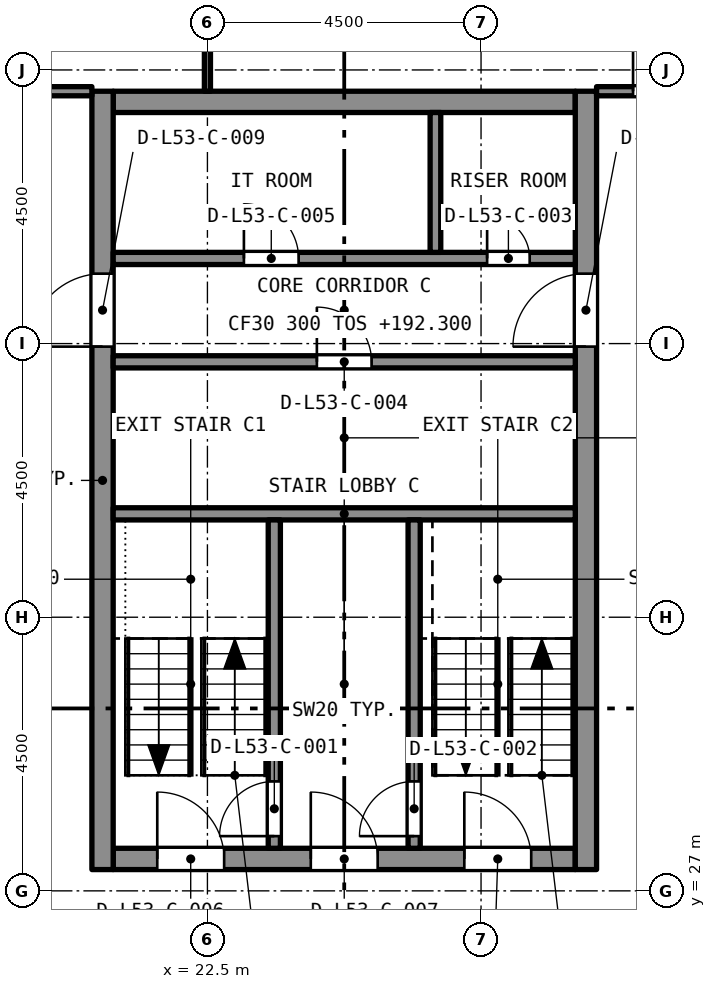
"""IFC4 building model, lengths in metres.
Left out: names, types, materials, properties, quantities, classifications, styles, units other than length and angle.
Written with IfcOpenShell. Run it as: python <this file> out.ifc"""

import sys

from ifc_helpers import new_model, si_unit, direction, frame, frame_2d, origin, place, context, subcontext, project, spatial, rectangle, extrude, element, fill, save


model = new_model("IFC4")
c1 = context("Model", 3, precision=1e-05, world=origin(), true_north=direction((0.0, 1.0)))
c2 = subcontext(c1, "Body", "Model", "MODEL_VIEW")
j1 = project(units=[si_unit("LENGTHUNIT", "METRE"), si_unit("PLANEANGLEUNIT", "RADIAN")], contexts=[c1])
p1 = place(None, origin())
s1 = spatial("IfcSite", under=j1, at=p1, CompositionType="ELEMENT")
p2 = place(p1, origin())
s2 = spatial("IfcBuilding", under=s1, at=p2, CompositionType="ELEMENT")
p3 = place(p2, frame((0.0, 0.0, 192.3)))
s3 = spatial("IfcBuildingStorey", under=s2, at=p3, CompositionType="ELEMENT", Elevation=192.3)
p4 = place(p3, frame((20.95, 27.525, 0.0), z_axis=(0.0, 0.0, 1.0), x_axis=(1.0, 0.0, 0.0)))
e1 = element("IfcWall", 1, at=p4, inside=s3, PredefinedType="SOLIDWALL", context=c2, shape_type="SweptSolid", body=[
    extrude(rectangle(XDim=7.6, YDim=0.35, at=frame_2d((3.8, 0.0))), origin(), (0.0, 0.0, 1.0), 3.2),
])
p5 = place(p4, frame((0.725, 0.0, 0.0)))
e2 = element("IfcOpeningElement", 2, at=p5, cuts=e1, PredefinedType="OPENING", context=c2, shape_type="SweptSolid", body=[
    extrude(rectangle(XDim=1.1, YDim=2.1, at=frame_2d((0.55, 1.05))), frame((0.0, 0.185, 0.0), z_axis=(0.0, -1.0, 0.0), x_axis=(1.0, 0.0, 0.0)), (0.0, 0.0, 1.0), 0.37),
])
p6 = place(p4, frame((3.25, 0.0, 0.0)))
e3 = element("IfcOpeningElement", 3, at=p6, cuts=e1, PredefinedType="OPENING", context=c2, shape_type="SweptSolid", body=[
    extrude(rectangle(XDim=1.1, YDim=2.1, at=frame_2d((0.55, 1.05))), frame((0.0, 0.185, 0.0), z_axis=(0.0, -1.0, 0.0), x_axis=(1.0, 0.0, 0.0)), (0.0, 0.0, 1.0), 0.37),
])
p7 = place(p4, frame((5.775, 0.0, 0.0)))
e4 = element("IfcOpeningElement", 4, at=p7, cuts=e1, PredefinedType="OPENING", context=c2, shape_type="SweptSolid", body=[
    extrude(rectangle(XDim=1.1, YDim=2.1, at=frame_2d((0.55, 1.05))), frame((0.0, 0.185, 0.0), z_axis=(0.0, -1.0, 0.0), x_axis=(1.0, 0.0, 0.0)), (0.0, 0.0, 1.0), 0.37),
])
p8 = place(p3, frame((20.95, 39.975, 0.0), z_axis=(0.0, 0.0, 1.0), x_axis=(1.0, 0.0, 0.0)))
e5 = element("IfcWall", 5, at=p8, inside=s3, PredefinedType="SOLIDWALL", context=c2, shape_type="SweptSolid", body=[
    extrude(rectangle(XDim=7.6, YDim=0.35, at=frame_2d((3.8, 0.0))), origin(), (0.0, 0.0, 1.0), 3.2),
])
p9 = place(p3, frame((20.775, 27.35, 0.0), z_axis=(0.0, 0.0, 1.0), x_axis=(0.0, 1.0, 0.0)))
e6 = element("IfcWall", 6, at=p9, inside=s3, PredefinedType="SOLIDWALL", context=c2, shape_type="SweptSolid", body=[
    extrude(rectangle(XDim=12.8, YDim=0.35, at=frame_2d((6.4, 0.0))), origin(), (0.0, 0.0, 1.0), 3.2),
])
p10 = place(p9, frame((8.6, 0.0, 0.0)))
e7 = element("IfcOpeningElement", 7, at=p10, cuts=e6, PredefinedType="OPENING", context=c2, shape_type="SweptSolid", body=[
    extrude(rectangle(XDim=1.2, YDim=2.1, at=frame_2d((0.6, 1.05))), frame((0.0, 0.185, 0.0), z_axis=(0.0, -1.0, 0.0), x_axis=(1.0, 0.0, 0.0)), (0.0, 0.0, 1.0), 0.37),
])
p11 = place(p3, frame((28.725, 27.35, 0.0), z_axis=(0.0, 0.0, 1.0), x_axis=(0.0, 1.0, 0.0)))
e8 = element("IfcWall", 8, at=p11, inside=s3, PredefinedType="SOLIDWALL", context=c2, shape_type="SweptSolid", body=[
    extrude(rectangle(XDim=12.8, YDim=0.35, at=frame_2d((6.4, 0.0))), origin(), (0.0, 0.0, 1.0), 3.2),
])
p12 = place(p11, frame((8.6, 0.0, 0.0)))
e9 = element("IfcOpeningElement", 9, at=p12, cuts=e8, PredefinedType="OPENING", context=c2, shape_type="SweptSolid", body=[
    extrude(rectangle(XDim=1.2, YDim=2.1, at=frame_2d((0.6, 1.05))), frame((0.0, 0.185, 0.0), z_axis=(0.0, -1.0, 0.0), x_axis=(1.0, 0.0, 0.0)), (0.0, 0.0, 1.0), 0.37),
])
p13 = place(p3, frame((18.4, 40.15, 0.0), z_axis=(0.0, 0.0, 1.0), x_axis=(1.0, 0.0, 0.0)))
e10 = element("IfcWall", 10, at=p13, inside=s3, PredefinedType="PARTITIONING", context=c2, shape_type="SweptSolid", body=[
    extrude(rectangle(XDim=2.2, YDim=0.15, at=frame_2d((1.1, 0.0))), origin(), (0.0, 0.0, 1.0), 2.75),
])
p14 = place(p13, frame((0.2, 0.0, 0.0)))
e11 = element("IfcOpeningElement", 11, at=p14, cuts=e10, PredefinedType="OPENING", context=c2, shape_type="SweptSolid", body=[
    extrude(rectangle(XDim=1.0, YDim=2.1, at=frame_2d((0.5, 1.05))), frame((0.0, 0.085, 0.0), z_axis=(0.0, -1.0, 0.0), x_axis=(1.0, 0.0, 0.0)), (0.0, 0.0, 1.0), 0.17),
])
p15 = place(p3, frame((28.9, 40.15, 0.0), z_axis=(0.0, 0.0, 1.0), x_axis=(1.0, 0.0, 0.0)))
e12 = element("IfcWall", 12, at=p15, inside=s3, PredefinedType="PARTITIONING", context=c2, shape_type="SweptSolid", body=[
    extrude(rectangle(XDim=2.2, YDim=0.15, at=frame_2d((1.1, 0.0))), origin(), (0.0, 0.0, 1.0), 2.75),
])
p16 = place(p15, frame((0.6, 0.0, 0.0)))
e13 = element("IfcOpeningElement", 13, at=p16, cuts=e12, PredefinedType="OPENING", context=c2, shape_type="SweptSolid", body=[
    extrude(rectangle(XDim=1.0, YDim=2.1, at=frame_2d((0.5, 1.05))), frame((0.0, 0.085, 0.0), z_axis=(0.0, -1.0, 0.0), x_axis=(1.0, 0.0, 0.0)), (0.0, 0.0, 1.0), 0.17),
])
p17 = place(p3, frame((22.5, 40.15, 0.0), z_axis=(0.0, 0.0, 1.0), x_axis=(0.0, 1.0, 0.0)))
e14 = element("IfcWall", 14, at=p17, inside=s3, PredefinedType="PARTITIONING", context=c2, shape_type="SweptSolid", body=[
    extrude(rectangle(XDim=8.95, YDim=0.1, at=frame_2d((4.475, 0.0))), origin(), (0.0, 0.0, 1.0), 2.75),
])
p18 = place(p3, frame((20.95, 33.2, 0.0), z_axis=(0.0, 0.0, 1.0), x_axis=(1.0, 0.0, 0.0)))
e15 = element("IfcWall", 15, at=p18, inside=s3, PredefinedType="SOLIDWALL", context=c2, shape_type="SweptSolid", body=[
    extrude(rectangle(XDim=7.6, YDim=0.2, at=frame_2d((3.8, 0.0))), origin(), (0.0, 0.0, 1.0), 2.9),
])
p19 = place(p3, frame((20.95, 35.7, 0.0), z_axis=(0.0, 0.0, 1.0), x_axis=(1.0, 0.0, 0.0)))
e16 = element("IfcWall", 16, at=p19, inside=s3, PredefinedType="SOLIDWALL", context=c2, shape_type="SweptSolid", body=[
    extrude(rectangle(XDim=7.6, YDim=0.2, at=frame_2d((3.8, 0.0))), origin(), (0.0, 0.0, 1.0), 2.9),
])
p20 = place(p19, frame((3.35, 0.0, 0.0)))
e17 = element("IfcOpeningElement", 17, at=p20, cuts=e16, PredefinedType="OPENING", context=c2, shape_type="SweptSolid", body=[
    extrude(rectangle(XDim=0.9, YDim=2.1, at=frame_2d((0.45, 1.05))), frame((0.0, 0.11, 0.0), z_axis=(0.0, -1.0, 0.0), x_axis=(1.0, 0.0, 0.0)), (0.0, 0.0, 1.0), 0.22),
])
p21 = place(p3, frame((20.95, 37.4, 0.0), z_axis=(0.0, 0.0, 1.0), x_axis=(1.0, 0.0, 0.0)))
e18 = element("IfcWall", 18, at=p21, inside=s3, PredefinedType="SOLIDWALL", context=c2, shape_type="SweptSolid", body=[
    extrude(rectangle(XDim=7.6, YDim=0.2, at=frame_2d((3.8, 0.0))), origin(), (0.0, 0.0, 1.0), 2.9),
])
p22 = place(p21, frame((6.15, 0.0, 0.0)))
e19 = element("IfcOpeningElement", 19, at=p22, cuts=e18, PredefinedType="OPENING", context=c2, shape_type="SweptSolid", body=[
    extrude(rectangle(XDim=0.7, YDim=2.1, at=frame_2d((0.35, 1.05))), frame((0.0, 0.11, 0.0), z_axis=(0.0, -1.0, 0.0), x_axis=(1.0, 0.0, 0.0)), (0.0, 0.0, 1.0), 0.22),
])
p23 = place(p21, frame((2.15, 0.0, 0.0)))
e20 = element("IfcOpeningElement", 20, at=p23, cuts=e18, PredefinedType="OPENING", context=c2, shape_type="SweptSolid", body=[
    extrude(rectangle(XDim=0.9, YDim=2.1, at=frame_2d((0.45, 1.05))), frame((0.0, 0.11, 0.0), z_axis=(0.0, -1.0, 0.0), x_axis=(1.0, 0.0, 0.0)), (0.0, 0.0, 1.0), 0.22),
])
p24 = place(p3, frame((23.6, 27.7, 0.0), z_axis=(0.0, 0.0, 1.0), x_axis=(0.0, 1.0, 0.0)))
e21 = element("IfcWall", 21, at=p24, inside=s3, PredefinedType="SOLIDWALL", context=c2, shape_type="SweptSolid", body=[
    extrude(rectangle(XDim=5.4, YDim=0.2, at=frame_2d((2.7, 0.0))), origin(), (0.0, 0.0, 1.0), 2.9),
])
p25 = place(p24, frame((0.2, 0.0, 0.0)))
e22 = element("IfcOpeningElement", 22, at=p25, cuts=e21, PredefinedType="OPENING", context=c2, shape_type="SweptSolid", body=[
    extrude(rectangle(XDim=0.9, YDim=2.1, at=frame_2d((0.45, 1.05))), frame((0.0, 0.11, 0.0), z_axis=(0.0, -1.0, 0.0), x_axis=(1.0, 0.0, 0.0)), (0.0, 0.0, 1.0), 0.22),
])
p26 = place(p3, frame((25.9, 27.7, 0.0), z_axis=(0.0, 0.0, 1.0), x_axis=(0.0, 1.0, 0.0)))
e23 = element("IfcWall", 23, at=p26, inside=s3, PredefinedType="SOLIDWALL", context=c2, shape_type="SweptSolid", body=[
    extrude(rectangle(XDim=5.4, YDim=0.2, at=frame_2d((2.7, 0.0))), origin(), (0.0, 0.0, 1.0), 2.9),
])
p27 = place(p26, frame((0.2, 0.0, 0.0)))
e24 = element("IfcOpeningElement", 24, at=p27, cuts=e23, PredefinedType="OPENING", context=c2, shape_type="SweptSolid", body=[
    extrude(rectangle(XDim=0.9, YDim=2.1, at=frame_2d((0.45, 1.05))), frame((0.0, 0.11, 0.0), z_axis=(0.0, -1.0, 0.0), x_axis=(1.0, 0.0, 0.0)), (0.0, 0.0, 1.0), 0.22),
])
p28 = place(p3, frame((26.25, 37.5, 0.0), z_axis=(0.0, 0.0, 1.0), x_axis=(0.0, 1.0, 0.0)))
e25 = element("IfcWall", 25, at=p28, inside=s3, PredefinedType="SOLIDWALL", context=c2, shape_type="SweptSolid", body=[
    extrude(rectangle(XDim=2.3, YDim=0.175, at=frame_2d((1.15, 0.0))), origin(), (0.0, 0.0, 1.0), 2.9),
])
p29 = place(p16, origin())
e26 = element("IfcDoor", 26, at=p29, inside=s3, OperationType="SINGLE_SWING_RIGHT", PredefinedType="DOOR", context=c2, shape_type="SweptSolid", body=[
    extrude(rectangle(XDim=1.0, YDim=2.1, at=frame_2d((0.5, 1.05))), frame((0.0, 0.025, 0.0), z_axis=(0.0, -1.0, 0.0), x_axis=(1.0, 0.0, 0.0)), (0.0, 0.0, 1.0), 0.05),
])
fill(e13, e26)
p30 = place(p25, origin())
e27 = element("IfcDoor", 27, at=p30, inside=s3, OperationType="SINGLE_SWING_LEFT", PredefinedType="DOOR", context=c2, shape_type="SweptSolid", body=[
    extrude(rectangle(XDim=0.9, YDim=2.1, at=frame_2d((0.45, 1.05))), frame((0.0, 0.025, 0.0), z_axis=(0.0, -1.0, 0.0), x_axis=(1.0, 0.0, 0.0)), (0.0, 0.0, 1.0), 0.05),
])
fill(e22, e27)
p31 = place(p27, origin())
e28 = element("IfcDoor", 28, at=p31, inside=s3, OperationType="SINGLE_SWING_LEFT", PredefinedType="DOOR", context=c2, shape_type="SweptSolid", body=[
    extrude(rectangle(XDim=0.9, YDim=2.1, at=frame_2d((0.45, 1.05))), frame((0.0, 0.025, 0.0), z_axis=(0.0, -1.0, 0.0), x_axis=(1.0, 0.0, 0.0)), (0.0, 0.0, 1.0), 0.05),
])
fill(e24, e28)
p32 = place(p22, origin())
e29 = element("IfcDoor", 29, at=p32, inside=s3, OperationType="SINGLE_SWING_LEFT", PredefinedType="DOOR", context=c2, shape_type="SweptSolid", body=[
    extrude(rectangle(XDim=0.7, YDim=2.1, at=frame_2d((0.35, 1.05))), frame((0.0, 0.025, 0.0), z_axis=(0.0, -1.0, 0.0), x_axis=(1.0, 0.0, 0.0)), (0.0, 0.0, 1.0), 0.05),
])
fill(e19, e29)
p33 = place(p20, origin())
e30 = element("IfcDoor", 30, at=p33, inside=s3, OperationType="SINGLE_SWING_LEFT", PredefinedType="DOOR", context=c2, shape_type="SweptSolid", body=[
    extrude(rectangle(XDim=0.9, YDim=2.1, at=frame_2d((0.45, 1.05))), frame((0.0, 0.025, 0.0), z_axis=(0.0, -1.0, 0.0), x_axis=(1.0, 0.0, 0.0)), (0.0, 0.0, 1.0), 0.05),
])
fill(e17, e30)
p34 = place(p23, origin())
e31 = element("IfcDoor", 31, at=p34, inside=s3, OperationType="SINGLE_SWING_LEFT", PredefinedType="DOOR", context=c2, shape_type="SweptSolid", body=[
    extrude(rectangle(XDim=0.9, YDim=2.1, at=frame_2d((0.45, 1.05))), frame((0.0, 0.025, 0.0), z_axis=(0.0, -1.0, 0.0), x_axis=(1.0, 0.0, 0.0)), (0.0, 0.0, 1.0), 0.05),
])
fill(e20, e31)
p35 = place(p5, origin())
e32 = element("IfcDoor", 32, at=p35, inside=s3, OperationType="SINGLE_SWING_LEFT", PredefinedType="DOOR", context=c2, shape_type="SweptSolid", body=[
    extrude(rectangle(XDim=1.1, YDim=2.1, at=frame_2d((0.55, 1.05))), frame((0.0, 0.025, 0.0), z_axis=(0.0, -1.0, 0.0), x_axis=(1.0, 0.0, 0.0)), (0.0, 0.0, 1.0), 0.05),
])
fill(e2, e32)
p36 = place(p6, origin())
e33 = element("IfcDoor", 33, at=p36, inside=s3, OperationType="SINGLE_SWING_LEFT", PredefinedType="DOOR", context=c2, shape_type="SweptSolid", body=[
    extrude(rectangle(XDim=1.1, YDim=2.1, at=frame_2d((0.55, 1.05))), frame((0.0, 0.025, 0.0), z_axis=(0.0, -1.0, 0.0), x_axis=(1.0, 0.0, 0.0)), (0.0, 0.0, 1.0), 0.05),
])
fill(e3, e33)
p37 = place(p7, origin())
e34 = element("IfcDoor", 34, at=p37, inside=s3, OperationType="SINGLE_SWING_LEFT", PredefinedType="DOOR", context=c2, shape_type="SweptSolid", body=[
    extrude(rectangle(XDim=1.1, YDim=2.1, at=frame_2d((0.55, 1.05))), frame((0.0, 0.025, 0.0), z_axis=(0.0, -1.0, 0.0), x_axis=(1.0, 0.0, 0.0)), (0.0, 0.0, 1.0), 0.05),
])
fill(e4, e34)
p38 = place(p10, origin())
e35 = element("IfcDoor", 35, at=p38, inside=s3, OperationType="SINGLE_SWING_LEFT", PredefinedType="DOOR", context=c2, shape_type="SweptSolid", body=[
    extrude(rectangle(XDim=1.2, YDim=2.1, at=frame_2d((0.6, 1.05))), frame((0.0, 0.025, 0.0), z_axis=(0.0, -1.0, 0.0), x_axis=(1.0, 0.0, 0.0)), (0.0, 0.0, 1.0), 0.05),
])
fill(e7, e35)
p39 = place(p12, origin())
e36 = element("IfcDoor", 36, at=p39, inside=s3, OperationType="SINGLE_SWING_LEFT", PredefinedType="DOOR", context=c2, shape_type="SweptSolid", body=[
    extrude(rectangle(XDim=1.2, YDim=2.1, at=frame_2d((0.6, 1.05))), frame((0.0, 0.025, 0.0), z_axis=(0.0, -1.0, 0.0), x_axis=(1.0, 0.0, 0.0)), (0.0, 0.0, 1.0), 0.05),
])
fill(e9, e36)
save(model, sys.argv[1])
